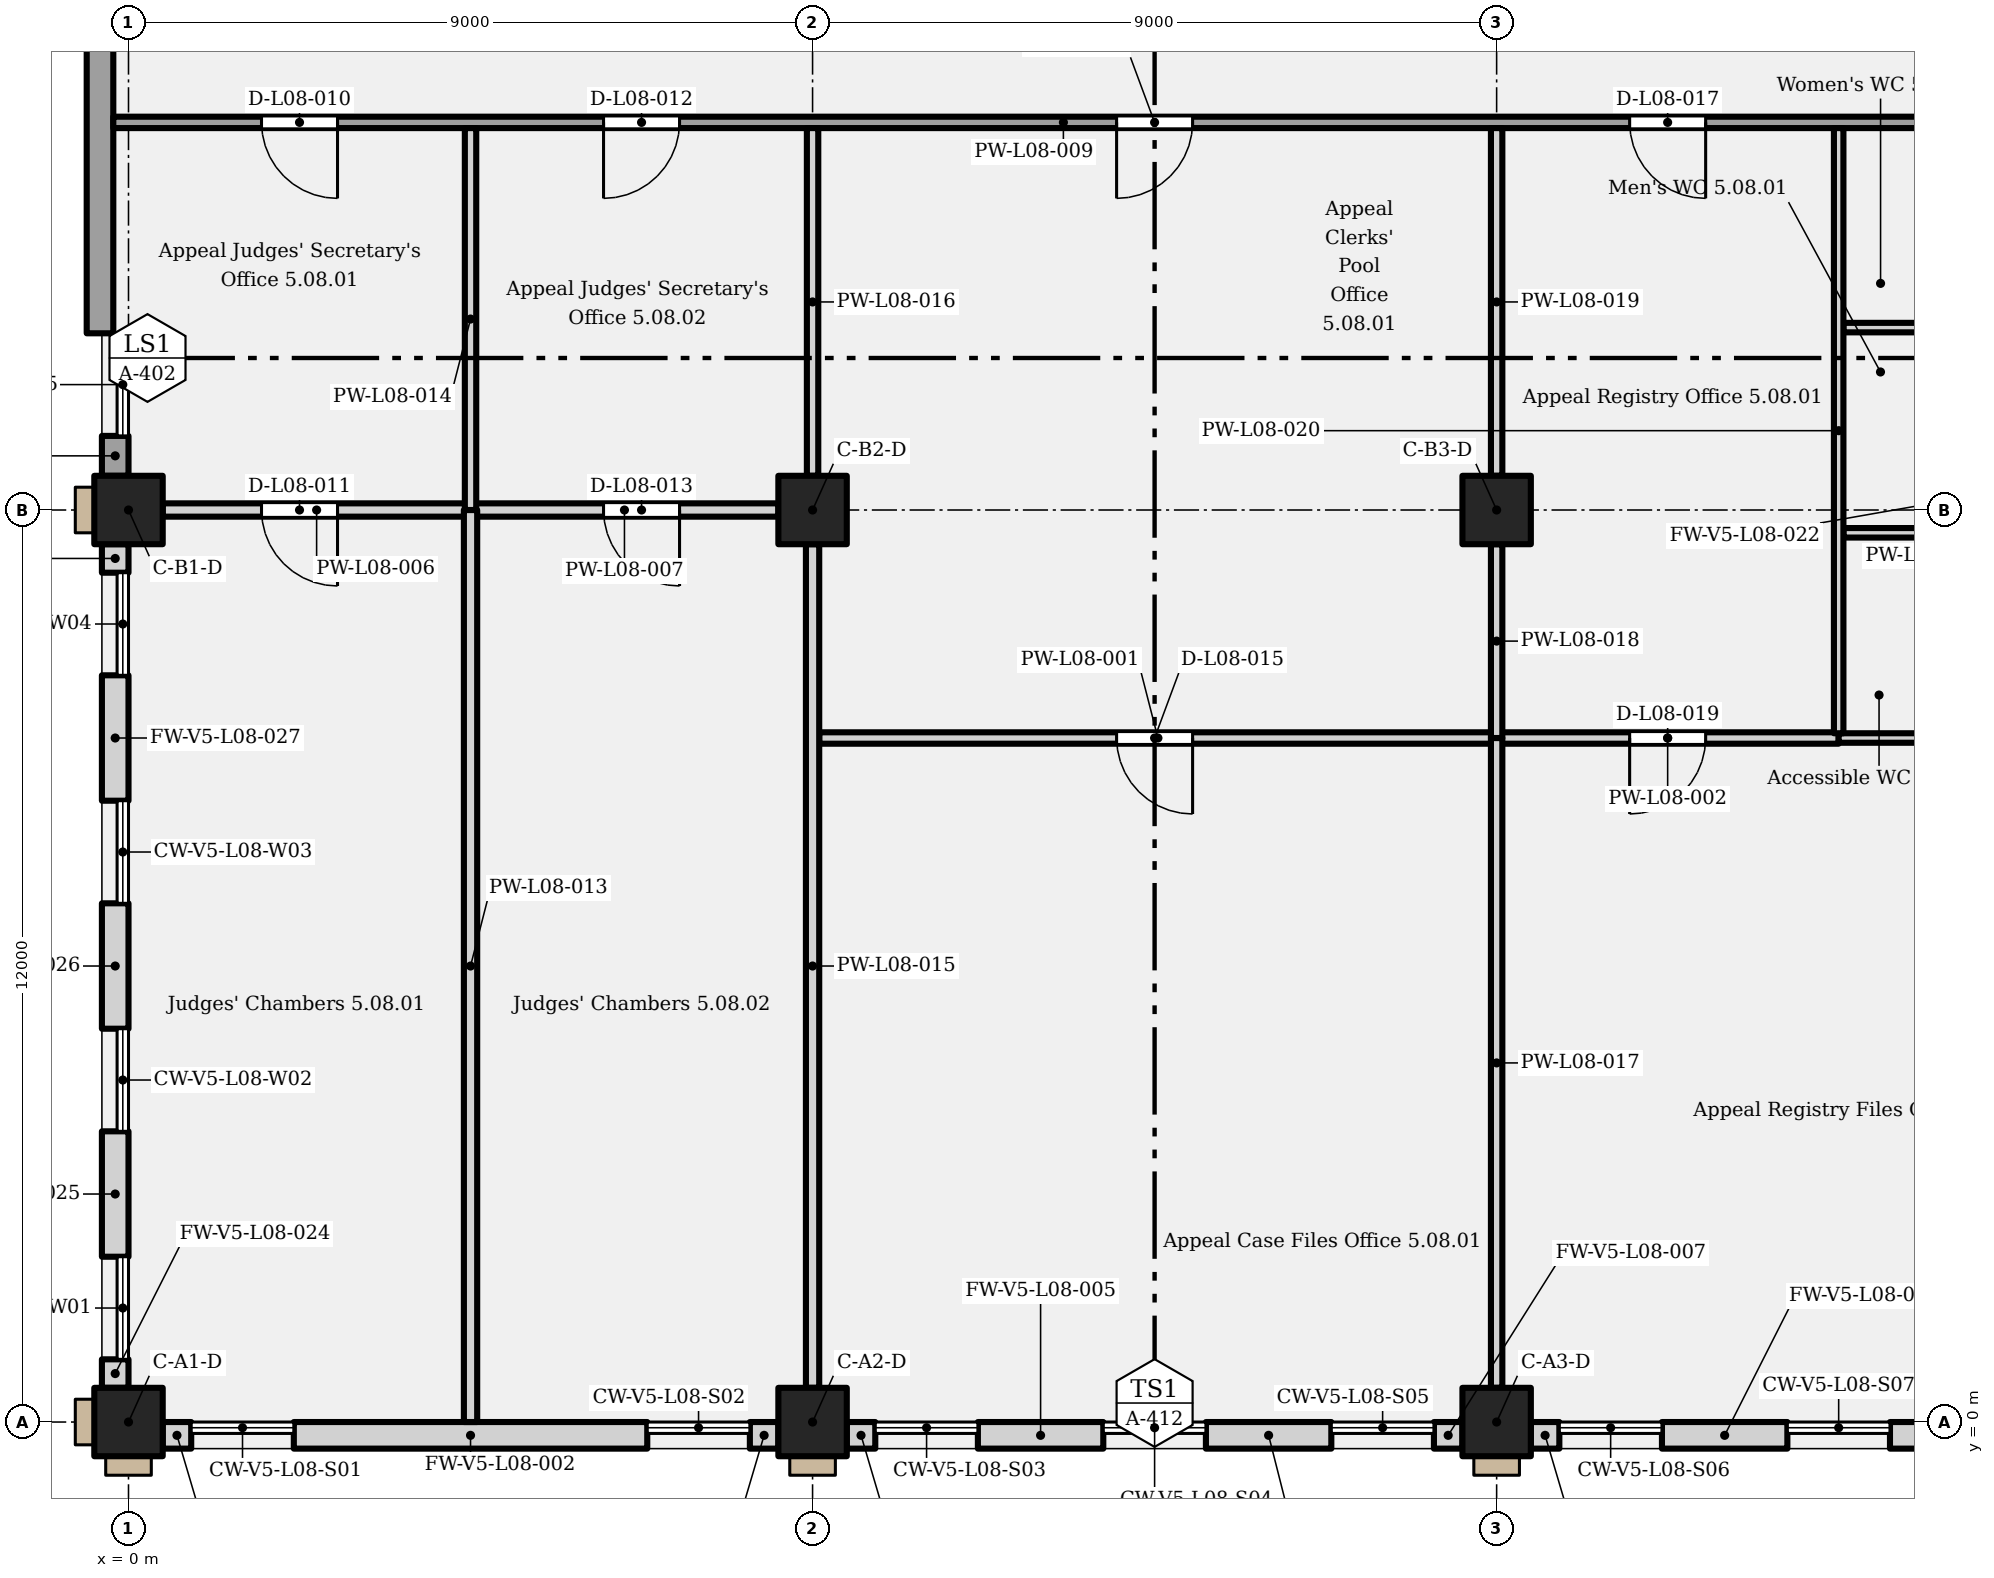
"""IFC4 building model, lengths in metres.
Left out: names, types, materials, properties, quantities, classifications, styles, units other than length and angle.
Written with IfcOpenShell. Run it as: python <this file> out.ifc"""

import sys

from ifc_helpers import new_model, si_unit, direction, frame, frame_2d, origin, origin_2d, place, context, subcontext, project, spatial, rectangle, extrude, element, fill, save


model = new_model("IFC4")
c1 = context("Model", 3, precision=1e-05, world=origin(), true_north=direction((0.0, 1.0)))
c2 = subcontext(c1, "Body", "Model", "MODEL_VIEW")
j1 = project(units=[si_unit("LENGTHUNIT", "METRE"), si_unit("PLANEANGLEUNIT", "RADIAN")], contexts=[c1])
p1 = place(None, origin())
s1 = spatial("IfcSite", under=j1, at=p1, CompositionType="ELEMENT")
p2 = place(p1, origin())
s2 = spatial("IfcBuilding", under=s1, at=p2, CompositionType="ELEMENT")
p3 = place(p2, frame((0.0, 0.0, 44.4)))
s3 = spatial("IfcBuildingStorey", under=s2, at=p3, CompositionType="ELEMENT", Elevation=44.4)
for number, where, z_axis, x_axis in (
    (1, (0.0, 0.0, 0.0), (0.0, 0.0, 1.0), (1.0, 0.0, 0.0)),
    (2, (9.0, 0.0, 0.0), (0.0, 0.0, 1.0), (1.0, 0.0, 0.0)),
    (3, (18.0, 0.0, 0.0), (0.0, 0.0, 1.0), (1.0, 0.0, 0.0)),
    (4, (0.0, 12.0, 0.0), (0.0, 0.0, 1.0), (1.0, 0.0, 0.0)),
    (5, (9.0, 12.0, 0.0), (0.0, 0.0, 1.0), (1.0, 0.0, 0.0)),
    (6, (18.0, 12.0, 0.0), (0.0, 0.0, 1.0), (1.0, 0.0, 0.0)),
):
    element("IfcColumn", number, at=place(p3, frame(where, z_axis=z_axis, x_axis=x_axis)), inside=s3, PredefinedType="COLUMN", context=c2, shape_type="SweptSolid", body=[
        extrude(rectangle(XDim=0.9, YDim=0.9, at=origin_2d()), origin(), (0.0, 0.0, 1.0), 4.5),
    ])
p4 = place(p3, frame((0.45, -0.175, 0.0), z_axis=(0.0, 0.0, 1.0), x_axis=(1.0, 0.0, 0.0)))
e7 = element("IfcWall", 7, at=p4, inside=s3, PredefinedType="SOLIDWALL", context=c2, shape_type="SweptSolid", body=[
    extrude(rectangle(XDim=0.375, YDim=0.35, at=frame_2d((0.188, 0.0))), origin(), (0.0, 0.0, 1.0), 4.25),
])
p5 = place(p3, frame((2.175, -0.175, 0.0), z_axis=(0.0, 0.0, 1.0), x_axis=(1.0, 0.0, 0.0)))
e8 = element("IfcWall", 8, at=p5, inside=s3, PredefinedType="SOLIDWALL", context=c2, shape_type="SweptSolid", body=[
    extrude(rectangle(XDim=4.65, YDim=0.35, at=frame_2d((2.325, 0.0))), origin(), (0.0, 0.0, 1.0), 4.25),
])
for number, where, z_axis, x_axis in (
    (9, (8.175, -0.175, 0.0), (0.0, 0.0, 1.0), (1.0, 0.0, 0.0)),
    (10, (9.45, -0.175, 0.0), (0.0, 0.0, 1.0), (1.0, 0.0, 0.0)),
):
    element("IfcWall", number, at=place(p3, frame(where, z_axis=z_axis, x_axis=x_axis)), inside=s3, PredefinedType="SOLIDWALL", context=c2, shape_type="SweptSolid", body=[
        extrude(rectangle(XDim=0.375, YDim=0.35, at=frame_2d((0.188, 0.0))), origin(), (0.0, 0.0, 1.0), 4.25),
    ])
for number, where, z_axis, x_axis in (
    (11, (11.175, -0.175, 0.0), (0.0, 0.0, 1.0), (1.0, 0.0, 0.0)),
    (12, (14.175, -0.175, 0.0), (0.0, 0.0, 1.0), (1.0, 0.0, 0.0)),
):
    element("IfcWall", number, at=place(p3, frame(where, z_axis=z_axis, x_axis=x_axis)), inside=s3, PredefinedType="SOLIDWALL", context=c2, shape_type="SweptSolid", body=[
        extrude(rectangle(XDim=1.65, YDim=0.35, at=frame_2d((0.825, 0.0))), origin(), (0.0, 0.0, 1.0), 4.25),
    ])
for number, where, z_axis, x_axis in (
    (13, (17.175, -0.175, 0.0), (0.0, 0.0, 1.0), (1.0, 0.0, 0.0)),
    (14, (18.45, -0.175, 0.0), (0.0, 0.0, 1.0), (1.0, 0.0, 0.0)),
):
    element("IfcWall", number, at=place(p3, frame(where, z_axis=z_axis, x_axis=x_axis)), inside=s3, PredefinedType="SOLIDWALL", context=c2, shape_type="SweptSolid", body=[
        extrude(rectangle(XDim=0.375, YDim=0.35, at=frame_2d((0.188, 0.0))), origin(), (0.0, 0.0, 1.0), 4.25),
    ])
for number, where, z_axis, x_axis in (
    (15, (20.175, -0.175, 0.0), (0.0, 0.0, 1.0), (1.0, 0.0, 0.0)),
    (16, (23.175, -0.175, 0.0), (0.0, 0.0, 1.0), (1.0, 0.0, 0.0)),
):
    element("IfcWall", number, at=place(p3, frame(where, z_axis=z_axis, x_axis=x_axis)), inside=s3, PredefinedType="SOLIDWALL", context=c2, shape_type="SweptSolid", body=[
        extrude(rectangle(XDim=1.65, YDim=0.35, at=frame_2d((0.825, 0.0))), origin(), (0.0, 0.0, 1.0), 4.25),
    ])
p6 = place(p3, frame((-0.175, 0.45, 0.0), z_axis=(0.0, 0.0, 1.0), x_axis=(0.0, 1.0, 0.0)))
e17 = element("IfcWall", 17, at=p6, inside=s3, PredefinedType="SOLIDWALL", context=c2, shape_type="SweptSolid", body=[
    extrude(rectangle(XDim=0.375, YDim=0.35, at=frame_2d((0.188, 0.0))), origin(), (0.0, 0.0, 1.0), 4.25),
])
for number, where, z_axis, x_axis in (
    (18, (-0.175, 2.175, 0.0), (0.0, 0.0, 1.0), (0.0, 1.0, 0.0)),
    (19, (-0.175, 5.175, 0.0), (0.0, 0.0, 1.0), (0.0, 1.0, 0.0)),
    (20, (-0.175, 8.175, 0.0), (0.0, 0.0, 1.0), (0.0, 1.0, 0.0)),
):
    element("IfcWall", number, at=place(p3, frame(where, z_axis=z_axis, x_axis=x_axis)), inside=s3, PredefinedType="SOLIDWALL", context=c2, shape_type="SweptSolid", body=[
        extrude(rectangle(XDim=1.65, YDim=0.35, at=frame_2d((0.825, 0.0))), origin(), (0.0, 0.0, 1.0), 4.25),
    ])
p7 = place(p3, frame((-0.175, 11.175, 0.0), z_axis=(0.0, 0.0, 1.0), x_axis=(0.0, 1.0, 0.0)))
e21 = element("IfcWall", 21, at=p7, inside=s3, PredefinedType="SOLIDWALL", context=c2, shape_type="SweptSolid", body=[
    extrude(rectangle(XDim=0.375, YDim=0.35, at=frame_2d((0.188, 0.0))), origin(), (0.0, 0.0, 1.0), 4.25),
])
p8 = place(p3, frame((-0.175, 12.45, 0.0), z_axis=(0.0, 0.0, 1.0), x_axis=(0.0, 1.0, 0.0)))
e22 = element("IfcWall", 22, at=p8, inside=s3, PredefinedType="SOLIDWALL", context=c2, shape_type="SweptSolid", body=[
    extrude(rectangle(XDim=0.525, YDim=0.35, at=frame_2d((0.263, 0.0))), origin(), (0.0, 0.0, 1.0), 4.25),
])
p9 = place(p3, frame((-0.375, 14.325, 0.0), z_axis=(0.0, 0.0, 1.0), x_axis=(0.0, 1.0, 0.0)))
e23 = element("IfcWall", 23, at=p9, inside=s3, PredefinedType="SOLIDWALL", context=c2, shape_type="SweptSolid", body=[
    extrude(rectangle(XDim=13.725, YDim=0.35, at=frame_2d((6.863, 0.0))), origin(), (0.0, 0.0, 1.0), 4.25),
])
p10 = place(p3, frame((9.087, 9.0, 0.0), z_axis=(0.0, 0.0, 1.0), x_axis=(1.0, 0.0, 0.0)))
e24 = element("IfcWall", 24, at=p10, inside=s3, PredefinedType="PARTITIONING", context=c2, shape_type="SweptSolid", body=[
    extrude(rectangle(XDim=8.913, YDim=0.15, at=frame_2d((4.456, 0.0))), origin(), (0.0, 0.0, 1.0), 4.25),
])
p11 = place(p10, frame((4.913, 0.0, 0.0), z_axis=(0.0, 0.0, 1.0), x_axis=(-1.0, 0.0, 0.0)))
e25 = element("IfcOpeningElement", 25, at=p11, cuts=e24, PredefinedType="OPENING", context=c2, shape_type="SweptSolid", body=[
    extrude(rectangle(XDim=1.0, YDim=2.1, at=frame_2d((0.5, 1.05))), frame((0.0, 0.085, 0.0), z_axis=(0.0, -1.0, 0.0), x_axis=(1.0, 0.0, 0.0)), (0.0, 0.0, 1.0), 0.17),
])
p12 = place(p3, frame((18.0, 9.0, 0.0), z_axis=(0.0, 0.0, 1.0), x_axis=(1.0, 0.0, 0.0)))
e26 = element("IfcWall", 26, at=p12, inside=s3, PredefinedType="PARTITIONING", context=c2, shape_type="SweptSolid", body=[
    extrude(rectangle(XDim=4.5, YDim=0.15, at=frame_2d((2.25, 0.0))), origin(), (0.0, 0.0, 1.0), 4.25),
])
p13 = place(p12, frame((2.75, 0.0, 0.0), z_axis=(0.0, 0.0, 1.0), x_axis=(-1.0, 0.0, 0.0)))
e27 = element("IfcOpeningElement", 27, at=p13, cuts=e26, PredefinedType="OPENING", context=c2, shape_type="SweptSolid", body=[
    extrude(rectangle(XDim=1.0, YDim=2.1, at=frame_2d((0.5, 1.05))), frame((0.0, 0.085, 0.0), z_axis=(0.0, -1.0, 0.0), x_axis=(1.0, 0.0, 0.0)), (0.0, 0.0, 1.0), 0.17),
])
p14 = place(p3, frame((22.5, 9.0, 0.0), z_axis=(0.0, 0.0, 1.0), x_axis=(1.0, 0.0, 0.0)))
e28 = element("IfcWall", 28, at=p14, inside=s3, PredefinedType="PARTITIONING", context=c2, shape_type="SweptSolid", body=[
    extrude(rectangle(XDim=2.3, YDim=0.125, at=frame_2d((1.15, 0.0))), origin(), (0.0, 0.0, 1.0), 4.25),
])
p15 = place(p3, frame((22.562, 11.7, 0.0), z_axis=(0.0, 0.0, 1.0), x_axis=(1.0, 0.0, 0.0)))
e29 = element("IfcWall", 29, at=p15, inside=s3, PredefinedType="PARTITIONING", context=c2, shape_type="SweptSolid", body=[
    extrude(rectangle(XDim=2.137, YDim=0.125, at=frame_2d((1.069, 0.0))), origin(), (0.0, 0.0, 1.0), 3.5),
])
p16 = place(p3, frame((0.45, 12.0, 0.0), z_axis=(0.0, 0.0, 1.0), x_axis=(1.0, 0.0, 0.0)))
e30 = element("IfcWall", 30, at=p16, inside=s3, PredefinedType="PARTITIONING", context=c2, shape_type="SweptSolid", body=[
    extrude(rectangle(XDim=4.05, YDim=0.175, at=frame_2d((2.025, 0.0))), origin(), (0.0, 0.0, 1.0), 3.5),
])
p17 = place(p16, frame((2.3, 0.0, 0.0), z_axis=(0.0, 0.0, 1.0), x_axis=(-1.0, 0.0, 0.0)))
e31 = element("IfcOpeningElement", 31, at=p17, cuts=e30, PredefinedType="OPENING", context=c2, shape_type="SweptSolid", body=[
    extrude(rectangle(XDim=1.0, YDim=2.1, at=frame_2d((0.5, 1.05))), frame((0.0, 0.097, 0.0), z_axis=(0.0, -1.0, 0.0), x_axis=(1.0, 0.0, 0.0)), (0.0, 0.0, 1.0), 0.195),
])
p18 = place(p3, frame((4.5, 12.0, 0.0), z_axis=(0.0, 0.0, 1.0), x_axis=(1.0, 0.0, 0.0)))
e32 = element("IfcWall", 32, at=p18, inside=s3, PredefinedType="PARTITIONING", context=c2, shape_type="SweptSolid", body=[
    extrude(rectangle(XDim=4.05, YDim=0.175, at=frame_2d((2.025, 0.0))), origin(), (0.0, 0.0, 1.0), 3.5),
])
p19 = place(p18, frame((2.75, 0.0, 0.0), z_axis=(0.0, 0.0, 1.0), x_axis=(-1.0, 0.0, 0.0)))
e33 = element("IfcOpeningElement", 33, at=p19, cuts=e32, PredefinedType="OPENING", context=c2, shape_type="SweptSolid", body=[
    extrude(rectangle(XDim=1.0, YDim=2.1, at=frame_2d((0.5, 1.05))), frame((0.0, 0.097, 0.0), z_axis=(0.0, -1.0, 0.0), x_axis=(1.0, 0.0, 0.0)), (0.0, 0.0, 1.0), 0.195),
])
p20 = place(p3, frame((22.562, 14.4, 0.0), z_axis=(0.0, 0.0, 1.0), x_axis=(1.0, 0.0, 0.0)))
e34 = element("IfcWall", 34, at=p20, inside=s3, PredefinedType="PARTITIONING", context=c2, shape_type="SweptSolid", body=[
    extrude(rectangle(XDim=2.137, YDim=0.125, at=frame_2d((1.069, 0.0))), origin(), (0.0, 0.0, 1.0), 4.25),
])
p21 = place(p3, frame((-0.2, 17.1, 0.0), z_axis=(0.0, 0.0, 1.0), x_axis=(1.0, 0.0, 0.0)))
e35 = element("IfcWall", 35, at=p21, inside=s3, PredefinedType="PARTITIONING", context=c2, shape_type="SweptSolid", body=[
    extrude(rectangle(XDim=25.0, YDim=0.15, at=frame_2d((12.5, 0.0))), origin(), (0.0, 0.0, 1.0), 4.25),
])
p22 = place(p21, frame((2.95, 0.0, 0.0), z_axis=(0.0, 0.0, 1.0), x_axis=(-1.0, 0.0, 0.0)))
e36 = element("IfcOpeningElement", 36, at=p22, cuts=e35, PredefinedType="OPENING", context=c2, shape_type="SweptSolid", body=[
    extrude(rectangle(XDim=1.0, YDim=2.1, at=frame_2d((0.5, 1.05))), frame((0.0, 0.085, 0.0), z_axis=(0.0, -1.0, 0.0), x_axis=(1.0, 0.0, 0.0)), (0.0, 0.0, 1.0), 0.17),
])
p23 = place(p21, frame((7.45, 0.0, 0.0), z_axis=(0.0, 0.0, 1.0), x_axis=(-1.0, 0.0, 0.0)))
e37 = element("IfcOpeningElement", 37, at=p23, cuts=e35, PredefinedType="OPENING", context=c2, shape_type="SweptSolid", body=[
    extrude(rectangle(XDim=1.0, YDim=2.1, at=frame_2d((0.5, 1.05))), frame((0.0, 0.085, 0.0), z_axis=(0.0, -1.0, 0.0), x_axis=(1.0, 0.0, 0.0)), (0.0, 0.0, 1.0), 0.17),
])
p24 = place(p21, frame((14.2, 0.0, 0.0), z_axis=(0.0, 0.0, 1.0), x_axis=(-1.0, 0.0, 0.0)))
e38 = element("IfcOpeningElement", 38, at=p24, cuts=e35, PredefinedType="OPENING", context=c2, shape_type="SweptSolid", body=[
    extrude(rectangle(XDim=1.0, YDim=2.1, at=frame_2d((0.5, 1.05))), frame((0.0, 0.085, 0.0), z_axis=(0.0, -1.0, 0.0), x_axis=(1.0, 0.0, 0.0)), (0.0, 0.0, 1.0), 0.17),
])
p25 = place(p21, frame((20.95, 0.0, 0.0), z_axis=(0.0, 0.0, 1.0), x_axis=(-1.0, 0.0, 0.0)))
e39 = element("IfcOpeningElement", 39, at=p25, cuts=e35, PredefinedType="OPENING", context=c2, shape_type="SweptSolid", body=[
    extrude(rectangle(XDim=1.0, YDim=2.1, at=frame_2d((0.5, 1.05))), frame((0.0, 0.085, 0.0), z_axis=(0.0, -1.0, 0.0), x_axis=(1.0, 0.0, 0.0)), (0.0, 0.0, 1.0), 0.17),
])
p26 = place(p3, frame((4.5, 0.0, 0.0), z_axis=(0.0, 0.0, 1.0), x_axis=(0.0, 1.0, 0.0)))
e40 = element("IfcWall", 40, at=p26, inside=s3, PredefinedType="PARTITIONING", context=c2, shape_type="SweptSolid", body=[
    extrude(rectangle(XDim=12.0, YDim=0.175, at=frame_2d((6.0, 0.0))), origin(), (0.0, 0.0, 1.0), 4.25),
])
p27 = place(p3, frame((4.5, 12.0, 0.0), z_axis=(0.0, 0.0, 1.0), x_axis=(0.0, 1.0, 0.0)))
e41 = element("IfcWall", 41, at=p27, inside=s3, PredefinedType="PARTITIONING", context=c2, shape_type="SweptSolid", body=[
    extrude(rectangle(XDim=5.025, YDim=0.15, at=frame_2d((2.512, 0.0))), origin(), (0.0, 0.0, 1.0), 4.25),
])
p28 = place(p3, frame((9.0, 0.45, 0.0), z_axis=(0.0, 0.0, 1.0), x_axis=(0.0, 1.0, 0.0)))
e42 = element("IfcWall", 42, at=p28, inside=s3, PredefinedType="PARTITIONING", context=c2, shape_type="SweptSolid", body=[
    extrude(rectangle(XDim=11.1, YDim=0.175, at=frame_2d((5.55, 0.0))), origin(), (0.0, 0.0, 1.0), 3.5),
])
p29 = place(p3, frame((9.0, 12.45, 0.0), z_axis=(0.0, 0.0, 1.0), x_axis=(0.0, 1.0, 0.0)))
e43 = element("IfcWall", 43, at=p29, inside=s3, PredefinedType="PARTITIONING", context=c2, shape_type="SweptSolid", body=[
    extrude(rectangle(XDim=4.575, YDim=0.15, at=frame_2d((2.288, 0.0))), origin(), (0.0, 0.0, 1.0), 3.3),
])
p30 = place(p3, frame((18.0, 0.45, 0.0), z_axis=(0.0, 0.0, 1.0), x_axis=(0.0, 1.0, 0.0)))
e44 = element("IfcWall", 44, at=p30, inside=s3, PredefinedType="PARTITIONING", context=c2, shape_type="SweptSolid", body=[
    extrude(rectangle(XDim=8.55, YDim=0.15, at=frame_2d((4.275, 0.0))), origin(), (0.0, 0.0, 1.0), 3.5),
])
p31 = place(p3, frame((18.0, 9.0, 0.0), z_axis=(0.0, 0.0, 1.0), x_axis=(0.0, 1.0, 0.0)))
e45 = element("IfcWall", 45, at=p31, inside=s3, PredefinedType="PARTITIONING", context=c2, shape_type="SweptSolid", body=[
    extrude(rectangle(XDim=2.55, YDim=0.15, at=frame_2d((1.275, 0.0))), origin(), (0.0, 0.0, 1.0), 3.5),
])
p32 = place(p3, frame((18.0, 12.45, 0.0), z_axis=(0.0, 0.0, 1.0), x_axis=(0.0, 1.0, 0.0)))
e46 = element("IfcWall", 46, at=p32, inside=s3, PredefinedType="PARTITIONING", context=c2, shape_type="SweptSolid", body=[
    extrude(rectangle(XDim=4.575, YDim=0.15, at=frame_2d((2.288, 0.0))), origin(), (0.0, 0.0, 1.0), 3.3),
])
p33 = place(p3, frame((22.5, 9.062, 0.0), z_axis=(0.0, 0.0, 1.0), x_axis=(0.0, 1.0, 0.0)))
e47 = element("IfcWall", 47, at=p33, inside=s3, PredefinedType="PARTITIONING", context=c2, shape_type="SweptSolid", body=[
    extrude(rectangle(XDim=7.962, YDim=0.125, at=frame_2d((3.981, 0.0))), origin(), (0.0, 0.0, 1.0), 4.25),
])
p34 = place(p22, origin())
e48 = element("IfcDoor", 48, at=p34, inside=s3, OperationType="SINGLE_SWING_LEFT", PredefinedType="DOOR", context=c2, shape_type="SweptSolid", body=[
    extrude(rectangle(XDim=1.0, YDim=2.1, at=frame_2d((0.5, 1.05))), frame((0.0, 0.025, 0.0), z_axis=(0.0, -1.0, 0.0), x_axis=(1.0, 0.0, 0.0)), (0.0, 0.0, 1.0), 0.05),
])
fill(e36, e48)
p35 = place(p17, origin())
e49 = element("IfcDoor", 49, at=p35, inside=s3, OperationType="SINGLE_SWING_LEFT", PredefinedType="DOOR", context=c2, shape_type="SweptSolid", body=[
    extrude(rectangle(XDim=1.0, YDim=2.1, at=frame_2d((0.5, 1.05))), frame((0.0, 0.025, 0.0), z_axis=(0.0, -1.0, 0.0), x_axis=(1.0, 0.0, 0.0)), (0.0, 0.0, 1.0), 0.05),
])
fill(e31, e49)
p36 = place(p23, origin())
e50 = element("IfcDoor", 50, at=p36, inside=s3, OperationType="SINGLE_SWING_RIGHT", PredefinedType="DOOR", context=c2, shape_type="SweptSolid", body=[
    extrude(rectangle(XDim=1.0, YDim=2.1, at=frame_2d((0.5, 1.05))), frame((0.0, 0.025, 0.0), z_axis=(0.0, -1.0, 0.0), x_axis=(1.0, 0.0, 0.0)), (0.0, 0.0, 1.0), 0.05),
])
fill(e37, e50)
p37 = place(p19, origin())
e51 = element("IfcDoor", 51, at=p37, inside=s3, OperationType="SINGLE_SWING_LEFT", PredefinedType="DOOR", context=c2, shape_type="SweptSolid", body=[
    extrude(rectangle(XDim=1.0, YDim=2.1, at=frame_2d((0.5, 1.05))), frame((0.0, 0.025, 0.0), z_axis=(0.0, -1.0, 0.0), x_axis=(1.0, 0.0, 0.0)), (0.0, 0.0, 1.0), 0.05),
])
fill(e33, e51)
p38 = place(p24, origin())
e52 = element("IfcDoor", 52, at=p38, inside=s3, OperationType="SINGLE_SWING_RIGHT", PredefinedType="DOOR", context=c2, shape_type="SweptSolid", body=[
    extrude(rectangle(XDim=1.0, YDim=2.1, at=frame_2d((0.5, 1.05))), frame((0.0, 0.025, 0.0), z_axis=(0.0, -1.0, 0.0), x_axis=(1.0, 0.0, 0.0)), (0.0, 0.0, 1.0), 0.05),
])
fill(e38, e52)
p39 = place(p11, origin())
e53 = element("IfcDoor", 53, at=p39, inside=s3, OperationType="SINGLE_SWING_LEFT", PredefinedType="DOOR", context=c2, shape_type="SweptSolid", body=[
    extrude(rectangle(XDim=1.0, YDim=2.1, at=frame_2d((0.5, 1.05))), frame((0.0, 0.025, 0.0), z_axis=(0.0, -1.0, 0.0), x_axis=(1.0, 0.0, 0.0)), (0.0, 0.0, 1.0), 0.05),
])
fill(e25, e53)
p40 = place(p25, origin())
e54 = element("IfcDoor", 54, at=p40, inside=s3, OperationType="SINGLE_SWING_LEFT", PredefinedType="DOOR", context=c2, shape_type="SweptSolid", body=[
    extrude(rectangle(XDim=1.0, YDim=2.1, at=frame_2d((0.5, 1.05))), frame((0.0, 0.025, 0.0), z_axis=(0.0, -1.0, 0.0), x_axis=(1.0, 0.0, 0.0)), (0.0, 0.0, 1.0), 0.05),
])
fill(e39, e54)
p41 = place(p13, origin())
e55 = element("IfcDoor", 55, at=p41, inside=s3, OperationType="SINGLE_SWING_RIGHT", PredefinedType="DOOR", context=c2, shape_type="SweptSolid", body=[
    extrude(rectangle(XDim=1.0, YDim=2.1, at=frame_2d((0.5, 1.05))), frame((0.0, 0.025, 0.0), z_axis=(0.0, -1.0, 0.0), x_axis=(1.0, 0.0, 0.0)), (0.0, 0.0, 1.0), 0.05),
])
fill(e27, e55)
save(model, sys.argv[1])
